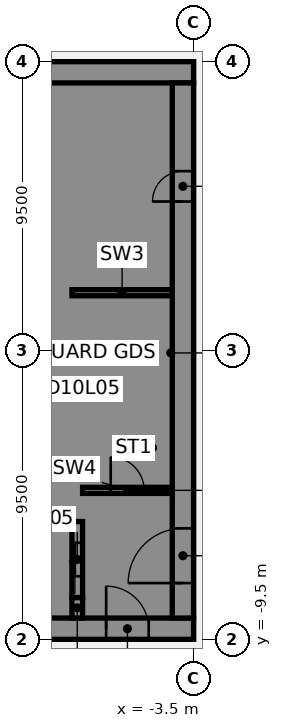
"""IFC4 building model, lengths in metres.
Left out: names, types, materials, properties, quantities, classifications, styles, units other than length and angle.
Written with IfcOpenShell. Run it as: python <this file> out.ifc"""

import sys

from ifc_helpers import new_model, si_unit, direction, frame, frame_2d, origin, place, context, subcontext, project, spatial, polyline, rectangle, outline, extrude, element, fill, save


model = new_model("IFC4")
c1 = context("Model", 3, precision=1e-05, world=origin(), true_north=direction((0.0, 1.0)))
c2 = subcontext(c1, "Body", "Model", "MODEL_VIEW")
j1 = project(units=[si_unit("LENGTHUNIT", "METRE"), si_unit("PLANEANGLEUNIT", "RADIAN")], contexts=[c1])
p1 = place(None, origin())
s1 = spatial("IfcSite", under=j1, at=p1, CompositionType="ELEMENT")
p2 = place(p1, origin())
s2 = spatial("IfcBuilding", under=s1, at=p2, CompositionType="ELEMENT")
p3 = place(p2, frame((0.0, 0.0, 29.5)))
s3 = spatial("IfcBuildingStorey", under=s2, at=p3, CompositionType="ELEMENT", Elevation=29.5)
p4 = place(p3, frame((-16.5, -9.15, 0.0), z_axis=(0.0, 0.0, 1.0), x_axis=(1.0, 0.0, 0.0)))
e1 = element("IfcWall", 1, at=p4, inside=s3, PredefinedType="SHEAR", context=c2, shape_type="SweptSolid", body=[
    extrude(rectangle(XDim=13.0, YDim=0.7, at=frame_2d((6.5, 0.0))), origin(), (0.0, 0.0, 1.0), 4.36),
])
p5 = place(p4, frame((4.15, 0.0, 0.0)))
e2 = element("IfcOpeningElement", 2, at=p5, cuts=e1, PredefinedType="OPENING", context=c2, shape_type="SweptSolid", body=[
    extrude(rectangle(XDim=1.4, YDim=2.1, at=frame_2d((0.7, 1.05))), frame((0.0, 0.36, 0.0), z_axis=(0.0, -1.0, 0.0), x_axis=(1.0, 0.0, 0.0)), (0.0, 0.0, 1.0), 0.72),
])
p6 = place(p4, frame((10.125, 0.0, 0.0)))
e3 = element("IfcOpeningElement", 3, at=p6, cuts=e1, PredefinedType="OPENING", context=c2, shape_type="SweptSolid", body=[
    extrude(rectangle(XDim=1.4, YDim=2.1, at=frame_2d((0.7, 1.05))), frame((0.0, 0.36, 0.0), z_axis=(0.0, -1.0, 0.0), x_axis=(1.0, 0.0, 0.0)), (0.0, 0.0, 1.0), 0.72),
])
p7 = place(p3, frame((-16.5, 9.15, 0.0), z_axis=(0.0, 0.0, 1.0), x_axis=(1.0, 0.0, 0.0)))
e4 = element("IfcWall", 4, at=p7, inside=s3, PredefinedType="SHEAR", context=c2, shape_type="SweptSolid", body=[
    extrude(rectangle(XDim=13.0, YDim=0.7, at=frame_2d((6.5, 0.0))), origin(), (0.0, 0.0, 1.0), 4.36),
])
p8 = place(p7, frame((4.15, 0.0, 0.0)))
e5 = element("IfcOpeningElement", 5, at=p8, cuts=e4, PredefinedType="OPENING", context=c2, shape_type="SweptSolid", body=[
    extrude(rectangle(XDim=1.4, YDim=2.1, at=frame_2d((0.7, 1.05))), frame((0.0, 0.36, 0.0), z_axis=(0.0, -1.0, 0.0), x_axis=(1.0, 0.0, 0.0)), (0.0, 0.0, 1.0), 0.72),
])
p9 = place(p3, origin())
e6 = element("IfcWall", 6, at=p9, inside=s3, PredefinedType="SHEAR", context=c2, shape_type="SweptSolid", body=[
    extrude(outline(polyline([(-9.8, -5.375), (-9.8, -5.625), (-7.5, -5.625), (-7.15, -5.625), (-7.15, 8.8), (-7.5, 8.8), (-9.8, 8.8), (-9.8, 8.125), (-7.5, 8.125), (-7.5, 5.625), (-9.8, 5.625), (-9.8, 5.375), (-7.5, 5.375), (-7.5, 2.875), (-9.8, 2.875), (-9.8, 2.625), (-7.5, 2.625), (-7.5, 0.125), (-9.8, 0.125), (-9.8, -0.125), (-7.5, -0.125), (-7.5, -2.625), (-9.8, -2.625), (-9.8, -2.875), (-7.5, -2.875), (-7.5, -5.375), (-9.8, -5.375)])), origin(), (0.0, 0.0, 1.0), 4.36),
])
p10 = place(p3, origin())
e7 = element("IfcWall", 7, at=p10, inside=s3, PredefinedType="SHEAR", context=c2, shape_type="SweptSolid", body=[
    extrude(outline(polyline([(-7.5, -8.125), (-9.55, -8.125), (-9.55, -5.625), (-9.8, -5.625), (-9.8, -8.125), (-9.8, -8.8), (-7.5, -8.8), (-7.5, -8.125)])), origin(), (0.0, 0.0, 1.0), 4.36),
])
p11 = place(p3, frame((-7.325, -8.8, 0.0), z_axis=(0.0, 0.0, 1.0), x_axis=(0.0, 1.0, 0.0)))
e8 = element("IfcWall", 8, at=p11, inside=s3, PredefinedType="SHEAR", context=c2, shape_type="SweptSolid", body=[
    extrude(rectangle(XDim=0.675, YDim=0.35, at=frame_2d((0.337, 0.0))), origin(), (0.0, 0.0, 1.0), 4.36),
])
p12 = place(p3, frame((-7.5, 1.9, 0.0), z_axis=(0.0, 0.0, 1.0), x_axis=(1.0, 0.0, 0.0)))
e9 = element("IfcWall", 9, at=p12, inside=s3, PredefinedType="SHEAR", context=c2, shape_type="SweptSolid", body=[
    extrude(rectangle(XDim=3.3, YDim=0.2, at=frame_2d((1.65, 0.0))), origin(), (0.0, 0.0, 1.0), 4.36),
])
p13 = place(p3, frame((-7.325, -8.125, 0.0), z_axis=(0.0, 0.0, 1.0), x_axis=(0.0, 1.0, 0.0)))
e10 = element("IfcWall", 10, at=p13, inside=s3, PredefinedType="SHEAR", context=c2, shape_type="SweptSolid", body=[
    extrude(rectangle(XDim=2.5, YDim=0.35, at=frame_2d((1.25, 0.0))), origin(), (0.0, 0.0, 1.0), 4.36),
])
p14 = place(p13, frame((0.7, 0.0, 0.0)))
e11 = element("IfcOpeningElement", 11, at=p14, cuts=e10, PredefinedType="OPENING", context=c2, shape_type="SweptSolid", body=[
    extrude(rectangle(XDim=1.1, YDim=2.1, at=frame_2d((0.55, 1.05))), frame((0.0, 0.185, 0.0), z_axis=(0.0, -1.0, 0.0), x_axis=(1.0, 0.0, 0.0)), (0.0, 0.0, 1.0), 0.37),
])
p15 = place(p3, frame((-3.85, -8.8, 0.0), z_axis=(0.0, 0.0, 1.0), x_axis=(0.0, 1.0, 0.0)))
e12 = element("IfcWall", 12, at=p15, inside=s3, PredefinedType="SHEAR", context=c2, shape_type="SweptSolid", body=[
    extrude(rectangle(XDim=17.6, YDim=0.7, at=frame_2d((8.8, 0.0))), origin(), (0.0, 0.0, 1.0), 4.36),
])
p16 = place(p15, frame((1.15, 0.0, 0.0)))
e13 = element("IfcOpeningElement", 13, at=p16, cuts=e12, PredefinedType="OPENING", context=c2, shape_type="SweptSolid", body=[
    extrude(rectangle(XDim=1.8, YDim=2.1, at=frame_2d((0.9, 1.05))), frame((0.0, 0.36, 0.0), z_axis=(0.0, -1.0, 0.0), x_axis=(1.0, 0.0, 0.0)), (0.0, 0.0, 1.0), 0.72),
])
p17 = place(p15, frame((13.7, 0.0, 0.0)))
e14 = element("IfcOpeningElement", 14, at=p17, cuts=e12, PredefinedType="OPENING", context=c2, shape_type="SweptSolid", body=[
    extrude(rectangle(XDim=1.0, YDim=2.1, at=frame_2d((0.5, 1.05))), frame((0.0, 0.36, 0.0), z_axis=(0.0, -1.0, 0.0), x_axis=(1.0, 0.0, 0.0)), (0.0, 0.0, 1.0), 0.72),
])
p18 = place(p3, frame((-7.15, -4.6, 0.0), z_axis=(0.0, 0.0, 1.0), x_axis=(1.0, 0.0, 0.0)))
e15 = element("IfcWall", 15, at=p18, inside=s3, PredefinedType="SHEAR", context=c2, shape_type="SweptSolid", body=[
    extrude(rectangle(XDim=2.95, YDim=0.2, at=frame_2d((1.475, 0.0))), origin(), (0.0, 0.0, 1.0), 4.36),
])
p19 = place(p18, frame((0.925, 0.0, 0.0)))
e16 = element("IfcOpeningElement", 16, at=p19, cuts=e15, PredefinedType="OPENING", context=c2, shape_type="SweptSolid", body=[
    extrude(rectangle(XDim=1.1, YDim=2.1, at=frame_2d((0.55, 1.05))), frame((0.0, 0.11, 0.0), z_axis=(0.0, -1.0, 0.0), x_axis=(1.0, 0.0, 0.0)), (0.0, 0.0, 1.0), 0.22),
])
p20 = place(p6, origin())
e17 = element("IfcDoor", 17, at=p20, inside=s3, OperationType="SINGLE_SWING_LEFT", PredefinedType="DOOR", context=c2, shape_type="SweptSolid", body=[
    extrude(rectangle(XDim=1.4, YDim=2.1, at=frame_2d((0.7, 1.05))), frame((0.0, 0.025, 0.0), z_axis=(0.0, -1.0, 0.0), x_axis=(1.0, 0.0, 0.0)), (0.0, 0.0, 1.0), 0.05),
])
fill(e3, e17)
p21 = place(p16, origin())
e18 = element("IfcDoor", 18, at=p21, inside=s3, OperationType="SINGLE_SWING_LEFT", PredefinedType="DOOR", context=c2, shape_type="SweptSolid", body=[
    extrude(rectangle(XDim=1.8, YDim=2.1, at=frame_2d((0.9, 1.05))), frame((0.0, 0.025, 0.0), z_axis=(0.0, -1.0, 0.0), x_axis=(1.0, 0.0, 0.0)), (0.0, 0.0, 1.0), 0.05),
])
fill(e13, e18)
p22 = place(p17, origin())
e19 = element("IfcDoor", 19, at=p22, inside=s3, OperationType="SINGLE_SWING_LEFT", PredefinedType="DOOR", context=c2, shape_type="SweptSolid", body=[
    extrude(rectangle(XDim=1.0, YDim=2.1, at=frame_2d((0.5, 1.05))), frame((0.0, 0.025, 0.0), z_axis=(0.0, -1.0, 0.0), x_axis=(1.0, 0.0, 0.0)), (0.0, 0.0, 1.0), 0.05),
])
fill(e14, e19)
p23 = place(p19, origin())
e20 = element("IfcDoor", 20, at=p23, inside=s3, OperationType="SINGLE_SWING_LEFT", PredefinedType="DOOR", context=c2, shape_type="SweptSolid", body=[
    extrude(rectangle(XDim=1.1, YDim=2.1, at=frame_2d((0.55, 1.05))), frame((0.0, 0.025, 0.0), z_axis=(0.0, -1.0, 0.0), x_axis=(1.0, 0.0, 0.0)), (0.0, 0.0, 1.0), 0.05),
])
fill(e16, e20)
p24 = place(p14, origin())
e21 = element("IfcDoor", 21, at=p24, inside=s3, OperationType="SLIDING_TO_LEFT", PredefinedType="DOOR", context=c2, shape_type="SweptSolid", body=[
    extrude(rectangle(XDim=1.1, YDim=2.1, at=frame_2d((0.55, 1.05))), frame((0.0, 0.025, 0.0), z_axis=(0.0, -1.0, 0.0), x_axis=(1.0, 0.0, 0.0)), (0.0, 0.0, 1.0), 0.05),
])
fill(e11, e21)
save(model, sys.argv[1])
